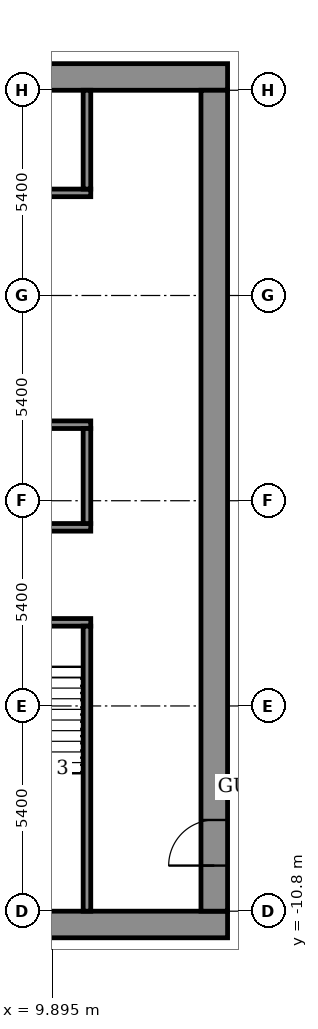
"""IFC4 building model, lengths in metres.
Left out: names, types, materials, properties, quantities, classifications, styles, units other than length and angle.
Written with IfcOpenShell. Run it as: python <this file> out.ifc"""

import sys

from ifc_helpers import new_model, si_unit, direction, frame, frame_2d, origin, place, context, subcontext, project, spatial, rectangle, extrude, element, fill, save


model = new_model("IFC4")
c1 = context("Model", 3, precision=1e-05, world=origin(), true_north=direction((0.0, 1.0)))
c2 = subcontext(c1, "Body", "Model", "MODEL_VIEW")
j1 = project(units=[si_unit("LENGTHUNIT", "METRE"), si_unit("PLANEANGLEUNIT", "RADIAN")], contexts=[c1])
p1 = place(None, origin())
s1 = spatial("IfcSite", under=j1, at=p1, CompositionType="ELEMENT")
p2 = place(p1, origin())
s2 = spatial("IfcBuilding", under=s1, at=p2, CompositionType="ELEMENT")
p3 = place(p2, frame((0.0, 0.0, 297.9)))
s3 = spatial("IfcBuildingStorey", under=s2, at=p3, CompositionType="ELEMENT", Elevation=297.9)
for number, where, z_axis, x_axis in (
    (1, (-14.5, -11.15, 0.0), (0.0, 0.0, 1.0), (1.0, 0.0, 0.0)),
    (2, (-14.5, 11.15, 0.0), (0.0, 0.0, 1.0), (1.0, 0.0, 0.0)),
):
    element("IfcWall", number, at=place(p3, frame(where, z_axis=z_axis, x_axis=x_axis)), inside=s3, PredefinedType="SHEAR", context=c2, shape_type="SweptSolid", body=[
        extrude(rectangle(XDim=29.0, YDim=0.7, at=frame_2d((14.5, 0.0))), origin(), (0.0, 0.0, 1.0), 3.6),
    ])
p4 = place(p3, frame((14.15, -10.8, 0.0), z_axis=(0.0, 0.0, 1.0), x_axis=(0.0, 1.0, 0.0)))
e3 = element("IfcWall", 3, at=p4, inside=s3, PredefinedType="SHEAR", context=c2, shape_type="SweptSolid", body=[
    extrude(rectangle(XDim=21.6, YDim=0.7, at=frame_2d((10.8, 0.0))), origin(), (0.0, 0.0, 1.0), 3.6),
])
p5 = place(p4, frame((1.2, 0.0, 0.0)))
e4 = element("IfcOpeningElement", 4, at=p5, cuts=e3, PredefinedType="OPENING", context=c2, shape_type="SweptSolid", body=[
    extrude(rectangle(XDim=1.2, YDim=2.1, at=frame_2d((0.6, 1.05))), frame((0.0, 0.36, 0.0), z_axis=(0.0, -1.0, 0.0), x_axis=(1.0, 0.0, 0.0)), (0.0, 0.0, 1.0), 0.72),
])
p6 = place(p3, frame((-10.9, -3.2, 0.0), z_axis=(0.0, 0.0, 1.0), x_axis=(1.0, 0.0, 0.0)))
e5 = element("IfcWall", 5, at=p6, inside=s3, PredefinedType="SHEAR", context=c2, shape_type="SweptSolid", body=[
    extrude(rectangle(XDim=21.8, YDim=0.2, at=frame_2d((10.9, 0.0))), origin(), (0.0, 0.0, 1.0), 3.05),
])
p7 = place(p6, frame((1.075, 0.0, 0.0)))
e6 = element("IfcOpeningElement", 6, at=p7, cuts=e5, PredefinedType="OPENING", context=c2, shape_type="SweptSolid", body=[
    extrude(rectangle(XDim=1.1, YDim=2.1, at=frame_2d((0.55, 1.05))), frame((0.0, 0.11, 0.0), z_axis=(0.0, -1.0, 0.0), x_axis=(1.0, 0.0, 0.0)), (0.0, 0.0, 1.0), 0.22),
])
p8 = place(p6, frame((10.325, 0.0, 0.0)))
e7 = element("IfcOpeningElement", 7, at=p8, cuts=e5, PredefinedType="OPENING", context=c2, shape_type="SweptSolid", body=[
    extrude(rectangle(XDim=1.1, YDim=2.1, at=frame_2d((0.55, 1.05))), frame((0.0, 0.11, 0.0), z_axis=(0.0, -1.0, 0.0), x_axis=(1.0, 0.0, 0.0)), (0.0, 0.0, 1.0), 0.22),
])
p9 = place(p6, frame((19.625, 0.0, 0.0)))
e8 = element("IfcOpeningElement", 8, at=p9, cuts=e5, PredefinedType="OPENING", context=c2, shape_type="SweptSolid", body=[
    extrude(rectangle(XDim=1.1, YDim=2.1, at=frame_2d((0.55, 1.05))), frame((0.0, 0.11, 0.0), z_axis=(0.0, -1.0, 0.0), x_axis=(1.0, 0.0, 0.0)), (0.0, 0.0, 1.0), 0.22),
])
p10 = place(p6, frame((5.7, 0.0, 0.0)))
e9 = element("IfcOpeningElement", 9, at=p10, cuts=e5, PredefinedType="OPENING", context=c2, shape_type="SweptSolid", body=[
    extrude(rectangle(XDim=1.1, YDim=2.1, at=frame_2d((0.55, 1.05))), frame((0.0, 0.11, 0.0), z_axis=(0.0, -1.0, 0.0), x_axis=(1.0, 0.0, 0.0)), (0.0, 0.0, 1.0), 0.22),
])
p11 = place(p6, frame((14.975, 0.0, 0.0)))
e10 = element("IfcOpeningElement", 10, at=p11, cuts=e5, PredefinedType="OPENING", context=c2, shape_type="SweptSolid", body=[
    extrude(rectangle(XDim=1.1, YDim=2.1, at=frame_2d((0.55, 1.05))), frame((0.0, 0.11, 0.0), z_axis=(0.0, -1.0, 0.0), x_axis=(1.0, 0.0, 0.0)), (0.0, 0.0, 1.0), 0.22),
])
p12 = place(p3, frame((-10.9, -0.7, 0.0), z_axis=(0.0, 0.0, 1.0), x_axis=(1.0, 0.0, 0.0)))
e11 = element("IfcWall", 11, at=p12, inside=s3, PredefinedType="SHEAR", context=c2, shape_type="SweptSolid", body=[
    extrude(rectangle(XDim=21.8, YDim=0.2, at=frame_2d((10.9, 0.0))), origin(), (0.0, 0.0, 1.0), 3.05),
])
p13 = place(p3, frame((-10.9, 2.0, 0.0), z_axis=(0.0, 0.0, 1.0), x_axis=(1.0, 0.0, 0.0)))
e12 = element("IfcWall", 12, at=p13, inside=s3, PredefinedType="SHEAR", context=c2, shape_type="SweptSolid", body=[
    extrude(rectangle(XDim=21.8, YDim=0.2, at=frame_2d((10.9, 0.0))), origin(), (0.0, 0.0, 1.0), 3.05),
])
p14 = place(p13, frame((4.95, 0.0, 0.0)))
e13 = element("IfcOpeningElement", 13, at=p14, cuts=e12, PredefinedType="OPENING", context=c2, shape_type="SweptSolid", body=[
    extrude(rectangle(XDim=1.1, YDim=2.1, at=frame_2d((0.55, 1.05))), frame((0.0, 0.11, 0.0), z_axis=(0.0, -1.0, 0.0), x_axis=(1.0, 0.0, 0.0)), (0.0, 0.0, 1.0), 0.22),
])
p15 = place(p13, frame((7.65, 0.0, 0.0)))
e14 = element("IfcOpeningElement", 14, at=p15, cuts=e12, PredefinedType="OPENING", context=c2, shape_type="SweptSolid", body=[
    extrude(rectangle(XDim=1.1, YDim=2.1, at=frame_2d((0.55, 1.05))), frame((0.0, 0.11, 0.0), z_axis=(0.0, -1.0, 0.0), x_axis=(1.0, 0.0, 0.0)), (0.0, 0.0, 1.0), 0.22),
])
p16 = place(p13, frame((10.35, 0.0, 0.0)))
e15 = element("IfcOpeningElement", 15, at=p16, cuts=e12, PredefinedType="OPENING", context=c2, shape_type="SweptSolid", body=[
    extrude(rectangle(XDim=1.1, YDim=2.1, at=frame_2d((0.55, 1.05))), frame((0.0, 0.11, 0.0), z_axis=(0.0, -1.0, 0.0), x_axis=(1.0, 0.0, 0.0)), (0.0, 0.0, 1.0), 0.22),
])
p17 = place(p13, frame((1.675, 0.0, 0.0)))
e16 = element("IfcOpeningElement", 16, at=p17, cuts=e12, PredefinedType="OPENING", context=c2, shape_type="SweptSolid", body=[
    extrude(rectangle(XDim=0.9, YDim=2.1, at=frame_2d((0.45, 1.05))), frame((0.0, 0.11, 0.0), z_axis=(0.0, -1.0, 0.0), x_axis=(1.0, 0.0, 0.0)), (0.0, 0.0, 1.0), 0.22),
])
p18 = place(p13, frame((16.525, 0.0, 0.0)))
e17 = element("IfcOpeningElement", 17, at=p18, cuts=e12, PredefinedType="OPENING", context=c2, shape_type="SweptSolid", body=[
    extrude(rectangle(XDim=0.9, YDim=2.1, at=frame_2d((0.45, 1.05))), frame((0.0, 0.11, 0.0), z_axis=(0.0, -1.0, 0.0), x_axis=(1.0, 0.0, 0.0)), (0.0, 0.0, 1.0), 0.22),
])
p19 = place(p3, frame((-10.9, 8.1, 0.0), z_axis=(0.0, 0.0, 1.0), x_axis=(1.0, 0.0, 0.0)))
e18 = element("IfcWall", 18, at=p19, inside=s3, PredefinedType="SHEAR", context=c2, shape_type="SweptSolid", body=[
    extrude(rectangle(XDim=21.8, YDim=0.2, at=frame_2d((10.9, 0.0))), origin(), (0.0, 0.0, 1.0), 3.05),
])
p20 = place(p19, frame((4.95, 0.0, 0.0)))
e19 = element("IfcOpeningElement", 19, at=p20, cuts=e18, PredefinedType="OPENING", context=c2, shape_type="SweptSolid", body=[
    extrude(rectangle(XDim=1.1, YDim=2.1, at=frame_2d((0.55, 1.05))), frame((0.0, 0.11, 0.0), z_axis=(0.0, -1.0, 0.0), x_axis=(1.0, 0.0, 0.0)), (0.0, 0.0, 1.0), 0.22),
])
p21 = place(p19, frame((7.65, 0.0, 0.0)))
e20 = element("IfcOpeningElement", 20, at=p21, cuts=e18, PredefinedType="OPENING", context=c2, shape_type="SweptSolid", body=[
    extrude(rectangle(XDim=1.1, YDim=2.1, at=frame_2d((0.55, 1.05))), frame((0.0, 0.11, 0.0), z_axis=(0.0, -1.0, 0.0), x_axis=(1.0, 0.0, 0.0)), (0.0, 0.0, 1.0), 0.22),
])
p22 = place(p19, frame((10.35, 0.0, 0.0)))
e21 = element("IfcOpeningElement", 21, at=p22, cuts=e18, PredefinedType="OPENING", context=c2, shape_type="SweptSolid", body=[
    extrude(rectangle(XDim=1.1, YDim=2.1, at=frame_2d((0.55, 1.05))), frame((0.0, 0.11, 0.0), z_axis=(0.0, -1.0, 0.0), x_axis=(1.0, 0.0, 0.0)), (0.0, 0.0, 1.0), 0.22),
])
p23 = place(p19, frame((1.675, 0.0, 0.0)))
e22 = element("IfcOpeningElement", 22, at=p23, cuts=e18, PredefinedType="OPENING", context=c2, shape_type="SweptSolid", body=[
    extrude(rectangle(XDim=0.9, YDim=2.1, at=frame_2d((0.45, 1.05))), frame((0.0, 0.11, 0.0), z_axis=(0.0, -1.0, 0.0), x_axis=(1.0, 0.0, 0.0)), (0.0, 0.0, 1.0), 0.22),
])
p24 = place(p19, frame((13.825, 0.0, 0.0)))
e23 = element("IfcOpeningElement", 23, at=p24, cuts=e18, PredefinedType="OPENING", context=c2, shape_type="SweptSolid", body=[
    extrude(rectangle(XDim=0.9, YDim=2.1, at=frame_2d((0.45, 1.05))), frame((0.0, 0.11, 0.0), z_axis=(0.0, -1.0, 0.0), x_axis=(1.0, 0.0, 0.0)), (0.0, 0.0, 1.0), 0.22),
])
p25 = place(p19, frame((18.55, 0.0, 0.0)))
e24 = element("IfcOpeningElement", 24, at=p25, cuts=e18, PredefinedType="OPENING", context=c2, shape_type="SweptSolid", body=[
    extrude(rectangle(XDim=0.9, YDim=2.1, at=frame_2d((0.45, 1.05))), frame((0.0, 0.11, 0.0), z_axis=(0.0, -1.0, 0.0), x_axis=(1.0, 0.0, 0.0)), (0.0, 0.0, 1.0), 0.22),
])
p26 = place(p3, frame((10.8, -10.8, 0.0), z_axis=(0.0, 0.0, 1.0), x_axis=(0.0, 1.0, 0.0)))
e25 = element("IfcWall", 25, at=p26, inside=s3, PredefinedType="SHEAR", context=c2, shape_type="SweptSolid", body=[
    extrude(rectangle(XDim=7.5, YDim=0.2, at=frame_2d((3.75, 0.0))), origin(), (0.0, 0.0, 1.0), 3.05),
])
p27 = place(p3, frame((10.8, -0.6, 0.0), z_axis=(0.0, 0.0, 1.0), x_axis=(0.0, 1.0, 0.0)))
e26 = element("IfcWall", 26, at=p27, inside=s3, PredefinedType="STANDARD", context=c2, shape_type="SweptSolid", body=[
    extrude(rectangle(XDim=2.5, YDim=0.2, at=frame_2d((1.25, 0.0))), origin(), (0.0, 0.0, 1.0), 3.05),
])
p28 = place(p3, frame((10.8, 8.2, 0.0), z_axis=(0.0, 0.0, 1.0), x_axis=(0.0, 1.0, 0.0)))
e27 = element("IfcWall", 27, at=p28, inside=s3, PredefinedType="STANDARD", context=c2, shape_type="SweptSolid", body=[
    extrude(rectangle(XDim=2.6, YDim=0.2, at=frame_2d((1.3, 0.0))), origin(), (0.0, 0.0, 1.0), 3.05),
])
p29 = place(p5, origin())
e28 = element("IfcDoor", 28, at=p29, inside=s3, OperationType="DOUBLE_DOOR_SINGLE_SWING", PredefinedType="DOOR", context=c2, shape_type="SweptSolid", body=[
    extrude(rectangle(XDim=1.2, YDim=2.1, at=frame_2d((0.6, 1.05))), frame((0.0, 0.025, 0.0), z_axis=(0.0, -1.0, 0.0), x_axis=(1.0, 0.0, 0.0)), (0.0, 0.0, 1.0), 0.05),
])
fill(e4, e28)
save(model, sys.argv[1])
